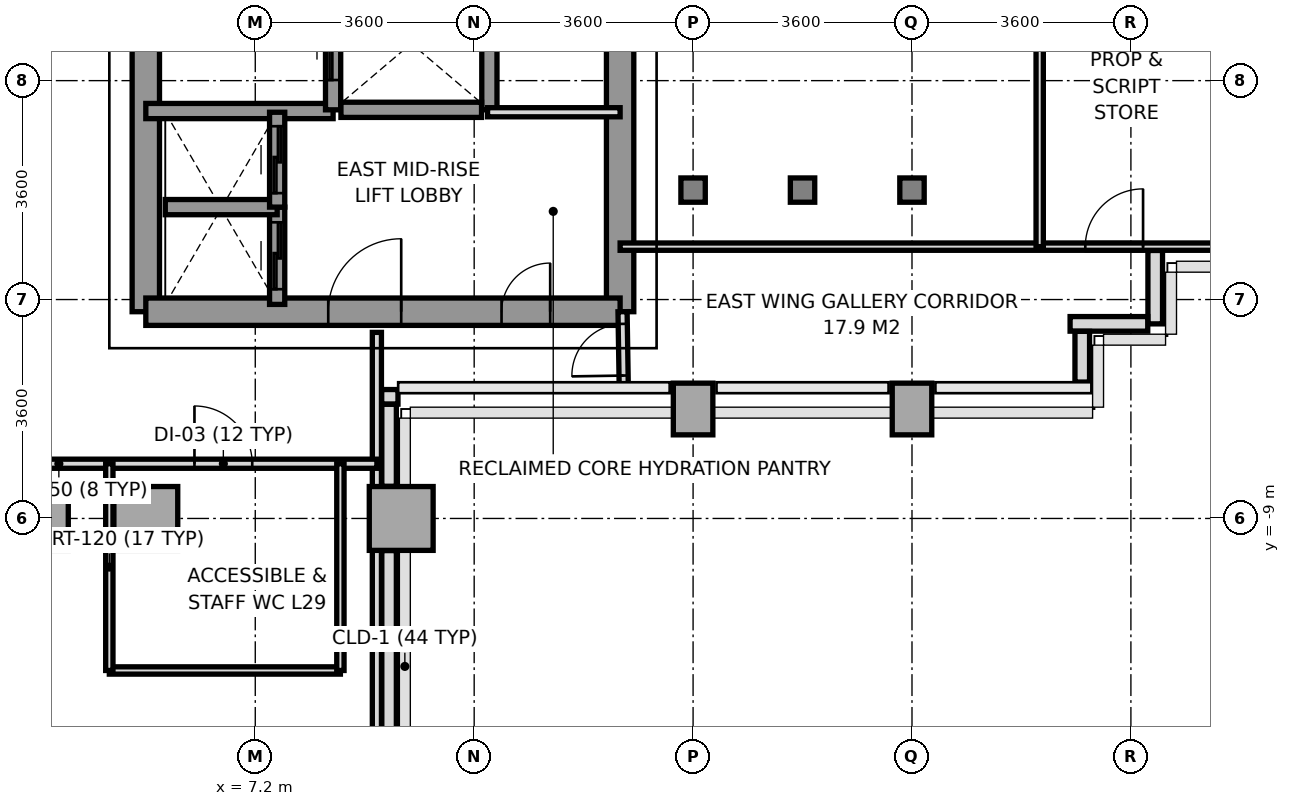
"""IFC4 building model, lengths in metres.
Left out: names, types, materials, properties, quantities, classifications, styles, units other than length and angle.
Written with IfcOpenShell. Run it as: python <this file> out.ifc"""

import sys

from ifc_helpers import new_model, si_unit, direction, frame, frame_2d, origin, origin_2d, place, context, subcontext, project, spatial, rectangle, i_section, extrude, source, transform, mapped, element, fill, save


model = new_model("IFC4")
c1 = context("Model", 3, precision=1e-05, world=origin(), true_north=direction((0.0, 1.0)))
c2 = subcontext(c1, "Body", "Model", "MODEL_VIEW")
j1 = project(units=[si_unit("LENGTHUNIT", "METRE"), si_unit("PLANEANGLEUNIT", "RADIAN")], contexts=[c1])
p1 = place(None, origin())
s1 = spatial("IfcSite", under=j1, at=p1, CompositionType="ELEMENT")
p2 = place(p1, origin())
s2 = spatial("IfcBuilding", under=s1, at=p2, CompositionType="ELEMENT")
p3 = place(p2, frame((0.0, 0.0, 110.8)))
s3 = spatial("IfcBuildingStorey", under=s2, at=p3, CompositionType="ELEMENT", Elevation=110.8)
m1 = source(origin(), c2, "Body", "SweptSolid", [
    extrude(rectangle(XDim=1.05, YDim=1.05, at=origin_2d()), origin(), (0.0, 0.0, 1.0), 3.2),
])
for number, where, z_axis, x_axis in (
    (1, (3.6, -9.0, 0.0), (0.0, 0.0, 1.0), (1.0, 0.0, 0.0)),
    (2, (5.4, -9.0, 0.0), (0.0, 0.0, 1.0), (1.0, 0.0, 0.0)),
    (3, (9.6, -9.0, 0.0), (0.0, 0.0, 1.0), (1.0, 0.0, 0.0)),
):
    element("IfcColumn", number, at=place(p3, frame(where, z_axis=z_axis, x_axis=x_axis)), inside=s3, PredefinedType="COLUMN", context=c2, shape_type="MappedRepresentation", body=[
        mapped(m1, transform((0.0, 0.0, 0.0), x_axis=(1.0, 0.0, 0.0), y_axis=(0.0, 1.0, 0.0), z_axis=(0.0, 0.0, 1.0), scale=1.0)),
    ])
m2 = source(origin(), c2, "Body", "SweptSolid", [
    extrude(rectangle(XDim=0.65, YDim=0.85, at=origin_2d()), origin(), (0.0, 0.0, 1.0), 3.2),
])
p4 = place(p3, frame((14.4, -7.2, 0.0), z_axis=(0.0, 0.0, 1.0), x_axis=(1.0, 0.0, 0.0)))
e4 = element("IfcColumn", 4, at=p4, inside=s3, PredefinedType="COLUMN", context=c2, shape_type="MappedRepresentation", body=[
    mapped(m2, transform((0.0, 0.0, 0.0), x_axis=(1.0, 0.0, 0.0), y_axis=(0.0, 1.0, 0.0), z_axis=(0.0, 0.0, 1.0), scale=1.0)),
])
m3 = source(origin(), c2, "Body", "SweptSolid", [
    extrude(i_section(OverallWidth=0.401, OverallDepth=0.399, WebThickness=0.02, FlangeThickness=0.032, at=origin_2d()), origin(), (0.0, 0.0, 1.0), 3.2),
])
for number, where, z_axis, x_axis in (
    (5, (14.4, -3.6, 0.0), (0.0, 0.0, 1.0), (1.0, 0.0, 0.0)),
    (6, (16.2, -3.6, 0.0), (0.0, 0.0, 1.0), (1.0, 0.0, 0.0)),
):
    element("IfcColumn", number, at=place(p3, frame(where, z_axis=z_axis, x_axis=x_axis)), inside=s3, PredefinedType="COLUMN", context=c2, shape_type="MappedRepresentation", body=[
        mapped(m3, transform((0.0, 0.0, 0.0), x_axis=(1.0, 0.0, 0.0), y_axis=(0.0, 1.0, 0.0), z_axis=(0.0, 0.0, 1.0), scale=1.0)),
    ])
p5 = place(p3, frame((18.0, -7.2, 0.0), z_axis=(0.0, 0.0, 1.0), x_axis=(1.0, 0.0, 0.0)))
e7 = element("IfcColumn", 7, at=p5, inside=s3, PredefinedType="COLUMN", context=c2, shape_type="MappedRepresentation", body=[
    mapped(m2, transform((0.0, 0.0, 0.0), x_axis=(1.0, 0.0, 0.0), y_axis=(0.0, 1.0, 0.0), z_axis=(0.0, 0.0, 1.0), scale=1.0)),
])
p6 = place(p3, frame((18.0, -3.6, 0.0), z_axis=(0.0, 0.0, 1.0), x_axis=(1.0, 0.0, 0.0)))
e8 = element("IfcColumn", 8, at=p6, inside=s3, PredefinedType="COLUMN", context=c2, shape_type="MappedRepresentation", body=[
    mapped(m3, transform((0.0, 0.0, 0.0), x_axis=(1.0, 0.0, 0.0), y_axis=(0.0, 1.0, 0.0), z_axis=(0.0, 0.0, 1.0), scale=1.0)),
])
p7 = place(p3, frame((22.0, -4.593, 0.0), z_axis=(0.0, 0.0, 1.0), x_axis=(0.0, -1.0, 0.0)))
e9 = element("IfcWall", 9, at=p7, inside=s3, PredefinedType="PARAPET", context=c2, shape_type="SweptSolid", body=[
    extrude(rectangle(XDim=1.207, YDim=0.24, at=frame_2d((0.604, 0.0))), origin(), (0.0, 0.0, 1.0), 1.15),
])
p8 = place(p3, frame((21.877, -5.8, 0.0), z_axis=(0.0, 0.0, 1.0), x_axis=(-1.0, 0.0, 0.0)))
e10 = element("IfcWall", 10, at=p8, inside=s3, PredefinedType="PARAPET", context=c2, shape_type="SweptSolid", body=[
    extrude(rectangle(XDim=1.277, YDim=0.24, at=frame_2d((0.638, 0.0))), origin(), (0.0, 0.0, 1.0), 1.15),
])
p9 = place(p3, frame((20.8, -5.923, 0.0), z_axis=(0.0, 0.0, 1.0), x_axis=(0.0, -1.0, 0.0)))
e11 = element("IfcWall", 11, at=p9, inside=s3, PredefinedType="PARAPET", context=c2, shape_type="SweptSolid", body=[
    extrude(rectangle(XDim=0.834, YDim=0.24, at=frame_2d((0.417, 0.0))), origin(), (0.0, 0.0, 1.0), 1.15),
])
p10 = place(p3, frame((9.547, -7.0, 0.0), z_axis=(0.0, 0.0, 1.0), x_axis=(-1.0, 0.0, 0.0)))
e12 = element("IfcWall", 12, at=p10, inside=s3, PredefinedType="PARAPET", context=c2, shape_type="SweptSolid", body=[
    extrude(rectangle(XDim=0.269, YDim=0.24, at=frame_2d((0.135, 0.0))), origin(), (0.0, 0.0, 1.0), 1.15),
])
p11 = place(p3, frame((9.4, -7.123, 0.0), z_axis=(0.0, 0.0, 1.0), x_axis=(0.0, -1.0, 0.0)))
e13 = element("IfcWall", 13, at=p11, inside=s3, PredefinedType="PARAPET", context=c2, shape_type="SweptSolid", body=[
    extrude(rectangle(XDim=1.349, YDim=0.24, at=frame_2d((0.674, 0.0))), origin(), (0.0, 0.0, 1.0), 1.15),
])
p12 = place(p3, frame((9.4, -9.528, 0.0), z_axis=(0.0, 0.0, 1.0), x_axis=(0.0, -1.0, 0.0)))
e14 = element("IfcWall", 14, at=p12, inside=s3, PredefinedType="PARAPET", context=c2, shape_type="SweptSolid", body=[
    extrude(rectangle(XDim=6.075, YDim=0.24, at=frame_2d((3.037, 0.0))), origin(), (0.0, 0.0, 1.0), 1.15),
])
p13 = place(p3, frame((13.2, -5.6, 0.0), z_axis=(0.0, 0.0, 1.0), x_axis=(0.0, 1.0, 0.0)))
e15 = element("IfcWall", 15, at=p13, inside=s3, PredefinedType="SHEAR", context=c2, shape_type="SweptSolid", body=[
    extrude(rectangle(XDim=11.2, YDim=0.45, at=frame_2d((5.6, 0.0))), origin(), (0.0, 0.0, 1.0), 3.2),
])
p14 = place(p3, frame((5.4, -5.6, 0.0), z_axis=(0.0, 0.0, 1.0), x_axis=(0.0, 1.0, 0.0)))
e16 = element("IfcWall", 16, at=p14, inside=s3, PredefinedType="SHEAR", context=c2, shape_type="SweptSolid", body=[
    extrude(rectangle(XDim=12.5, YDim=0.45, at=frame_2d((6.25, 0.0))), origin(), (0.0, 0.0, 1.0), 3.2),
])
p15 = place(p14, frame((4.55, 0.0, 0.0)))
e17 = element("IfcOpeningElement", 17, at=p15, cuts=e16, PredefinedType="OPENING", context=c2, shape_type="SweptSolid", body=[
    extrude(rectangle(XDim=1.2, YDim=2.2, at=frame_2d((0.6, 1.1))), frame((0.0, 0.235, 0.0), z_axis=(0.0, -1.0, 0.0), x_axis=(1.0, 0.0, 0.0)), (0.0, 0.0, 1.0), 0.47),
])
p16 = place(p3, frame((5.4, -5.6, 0.0), z_axis=(0.0, 0.0, 1.0), x_axis=(1.0, 0.0, 0.0)))
e18 = element("IfcWall", 18, at=p16, inside=s3, PredefinedType="SHEAR", context=c2, shape_type="SweptSolid", body=[
    extrude(rectangle(XDim=7.8, YDim=0.45, at=frame_2d((3.9, 0.0))), origin(), (0.0, 0.0, 1.0), 3.2),
])
p17 = place(p16, frame((3.0, 0.0, 0.0)))
e19 = element("IfcOpeningElement", 19, at=p17, cuts=e18, PredefinedType="OPENING", context=c2, shape_type="SweptSolid", body=[
    extrude(rectangle(XDim=1.2, YDim=2.2, at=frame_2d((0.6, 1.1))), frame((0.0, 0.235, 0.0), z_axis=(0.0, -1.0, 0.0), x_axis=(1.0, 0.0, 0.0)), (0.0, 0.0, 1.0), 0.47),
])
p18 = place(p16, frame((5.85, 0.0, 0.0)))
e20 = element("IfcOpeningElement", 20, at=p18, cuts=e18, PredefinedType="OPENING", context=c2, shape_type="SweptSolid", body=[
    extrude(rectangle(XDim=0.8, YDim=2.1, at=frame_2d((0.4, 1.05))), frame((0.0, 0.235, 0.0), z_axis=(0.0, -1.0, 0.0), x_axis=(1.0, 0.0, 0.0)), (0.0, 0.0, 1.0), 0.47),
])
p19 = place(p3, frame((5.4, -2.3, 0.0), z_axis=(0.0, 0.0, 1.0), x_axis=(1.0, 0.0, 0.0)))
e21 = element("IfcWall", 21, at=p19, inside=s3, PredefinedType="SOLIDWALL", context=c2, shape_type="SweptSolid", body=[
    extrude(rectangle(XDim=3.08, YDim=0.25, at=frame_2d((1.54, 0.0))), origin(), (0.0, 0.0, 1.0), 3.2),
])
p20 = place(p3, frame((8.48, -2.28, 0.0), z_axis=(0.0, 0.0, 1.0), x_axis=(0.0, 1.0, 0.0)))
e22 = element("IfcWall", 22, at=p20, inside=s3, PredefinedType="SOLIDWALL", context=c2, shape_type="SweptSolid", body=[
    extrude(rectangle(XDim=2.18, YDim=0.25, at=frame_2d((1.09, 0.0))), origin(), (0.0, 0.0, 1.0), 3.2),
])
p21 = place(p20, frame((0.49, 0.0, 0.0)))
e23 = element("IfcOpeningElement", 23, at=p21, cuts=e22, PredefinedType="OPENING", context=c2, shape_type="SweptSolid", body=[
    extrude(rectangle(XDim=1.2, YDim=2.2, at=frame_2d((0.6, 1.1))), frame((0.0, 0.135, 0.0), z_axis=(0.0, -1.0, 0.0), x_axis=(1.0, 0.0, 0.0)), (0.0, 0.0, 1.0), 0.27),
])
p22 = place(p3, frame((11.05, -2.28, 0.0), z_axis=(0.0, 0.0, 1.0), x_axis=(0.0, 1.0, 0.0)))
e24 = element("IfcWall", 24, at=p22, inside=s3, PredefinedType="SOLIDWALL", context=c2, shape_type="SweptSolid", body=[
    extrude(rectangle(XDim=2.18, YDim=0.25, at=frame_2d((1.09, 0.0))), origin(), (0.0, 0.0, 1.0), 3.2),
])
p23 = place(p3, frame((8.609, -2.28, 0.0), z_axis=(0.0, 0.0, 1.0), x_axis=(1.0, 0.0, 0.0)))
e25 = element("IfcWall", 25, at=p23, inside=s3, PredefinedType="SOLIDWALL", context=c2, shape_type="SweptSolid", body=[
    extrude(rectangle(XDim=2.312, YDim=0.25, at=frame_2d((1.156, 0.0))), origin(), (0.0, 0.0, 1.0), 3.2),
])
p24 = place(p3, frame((7.56, -5.48, 0.0), z_axis=(0.0, 0.0, 1.0), x_axis=(0.0, 1.0, 0.0)))
e26 = element("IfcWall", 26, at=p24, inside=s3, PredefinedType="SOLIDWALL", context=c2, shape_type="SweptSolid", body=[
    extrude(rectangle(XDim=1.6, YDim=0.25, at=frame_2d((0.8, 0.0))), origin(), (0.0, 0.0, 1.0), 3.2),
])
p25 = place(p24, frame((0.25, 0.0, 0.0)))
e27 = element("IfcOpeningElement", 27, at=p25, cuts=e26, PredefinedType="OPENING", context=c2, shape_type="SweptSolid", body=[
    extrude(rectangle(XDim=1.1, YDim=2.2, at=frame_2d((0.55, 1.1))), frame((0.0, 0.135, 0.0), z_axis=(0.0, -1.0, 0.0), x_axis=(1.0, 0.0, 0.0)), (0.0, 0.0, 1.0), 0.27),
])
p26 = place(p3, frame((5.72, -3.88, 0.0), z_axis=(0.0, 0.0, 1.0), x_axis=(1.0, 0.0, 0.0)))
e28 = element("IfcWall", 28, at=p26, inside=s3, PredefinedType="SOLIDWALL", context=c2, shape_type="SweptSolid", body=[
    extrude(rectangle(XDim=1.84, YDim=0.25, at=frame_2d((0.92, 0.0))), origin(), (0.0, 0.0, 1.0), 3.2),
])
p27 = place(p3, frame((7.56, -3.88, 0.0), z_axis=(0.0, 0.0, 1.0), x_axis=(0.0, 1.0, 0.0)))
e29 = element("IfcWall", 29, at=p27, inside=s3, PredefinedType="SOLIDWALL", context=c2, shape_type="SweptSolid", body=[
    extrude(rectangle(XDim=1.56, YDim=0.25, at=frame_2d((0.78, 0.0))), origin(), (0.0, 0.0, 1.0), 3.2),
])
p28 = place(p27, frame((0.23, 0.0, 0.0)))
e30 = element("IfcOpeningElement", 30, at=p28, cuts=e29, PredefinedType="OPENING", context=c2, shape_type="SweptSolid", body=[
    extrude(rectangle(XDim=1.1, YDim=2.2, at=frame_2d((0.55, 1.1))), frame((0.0, 0.135, 0.0), z_axis=(0.0, -1.0, 0.0), x_axis=(1.0, 0.0, 0.0)), (0.0, 0.0, 1.0), 0.27),
])
p29 = place(p3, frame((11.02, -2.32, 0.0), z_axis=(0.0, 0.0, 1.0), x_axis=(1.0, 0.0, 0.0)))
e31 = element("IfcWall", 31, at=p29, inside=s3, PredefinedType="PARTITIONING", context=c2, shape_type="SweptSolid", body=[
    extrude(rectangle(XDim=2.18, YDim=0.15, at=frame_2d((1.09, 0.0))), origin(), (0.0, 0.0, 1.0), 3.2),
])
p30 = place(p3, frame((9.2, -15.68, 0.0), z_axis=(0.0, 0.0, 1.0), x_axis=(0.0, 1.0, 0.0)))
e32 = element("IfcWall", 32, at=p30, inside=s3, PredefinedType="PARTITIONING", context=c2, shape_type="SweptSolid", body=[
    extrude(rectangle(XDim=9.74, YDim=0.15, at=frame_2d((4.87, 0.0))), origin(), (0.0, 0.0, 1.0), 2.7),
])
p31 = place(p3, frame((-1.26, -8.1, 0.0), z_axis=(0.0, 0.0, 1.0), x_axis=(1.0, 0.0, 0.0)))
e33 = element("IfcWall", 33, at=p31, inside=s3, PredefinedType="PARTITIONING", context=c2, shape_type="SweptSolid", body=[
    extrude(rectangle(XDim=10.46, YDim=0.15, at=frame_2d((5.23, 0.0))), origin(), (0.0, 0.0, 1.0), 2.76),
])
p32 = place(p31, frame((7.46, 0.0, 0.0)))
e34 = element("IfcOpeningElement", 34, at=p32, cuts=e33, PredefinedType="OPENING", context=c2, shape_type="SweptSolid", body=[
    extrude(rectangle(XDim=0.95, YDim=2.15, at=frame_2d((0.475, 1.075))), frame((0.0, 0.085, 0.0), z_axis=(0.0, -1.0, 0.0), x_axis=(1.0, 0.0, 0.0)), (0.0, 0.0, 1.0), 0.17),
])
p33 = place(p3, frame((4.8, -11.5, 0.0), z_axis=(0.0, 0.0, 1.0), x_axis=(1.0, 0.0, 0.0)))
e35 = element("IfcWall", 35, at=p33, inside=s3, PredefinedType="PARTITIONING", context=c2, shape_type="SweptSolid", body=[
    extrude(rectangle(XDim=3.8, YDim=0.12, at=frame_2d((1.9, 0.0))), origin(), (0.0, 0.0, 1.0), 3.2),
])
p34 = place(p3, frame((4.8, -11.5, 0.0), z_axis=(0.0, 0.0, 1.0), x_axis=(0.0, 1.0, 0.0)))
e36 = element("IfcWall", 36, at=p34, inside=s3, PredefinedType="PARTITIONING", context=c2, shape_type="SweptSolid", body=[
    extrude(rectangle(XDim=3.4, YDim=0.12, at=frame_2d((1.7, 0.0))), origin(), (0.0, 0.0, 1.0), 3.2),
])
p35 = place(p3, frame((8.6, -11.5, 0.0), z_axis=(0.0, 0.0, 1.0), x_axis=(0.0, 1.0, 0.0)))
e37 = element("IfcWall", 37, at=p35, inside=s3, PredefinedType="PARTITIONING", context=c2, shape_type="SweptSolid", body=[
    extrude(rectangle(XDim=3.4, YDim=0.12, at=frame_2d((1.7, 0.0))), origin(), (0.0, 0.0, 1.0), 2.7),
])
p36 = place(p3, frame((13.26, -6.85, 0.0), z_axis=(0.0, 0.0, 1.0), x_axis=(-0.016013571389, 0.999871774545, 0.0)))
e38 = element("IfcWall", 38, at=p36, inside=s3, PredefinedType="PARTITIONING", context=c2, shape_type="SweptSolid", body=[
    extrude(rectangle(XDim=1.25, YDim=0.15, at=frame_2d((0.625, 0.0))), origin(), (0.0, 0.0, 1.0), 3.2),
])
p37 = place(p36, frame((0.2, 0.0, 0.0)))
e39 = element("IfcOpeningElement", 39, at=p37, cuts=e38, PredefinedType="OPENING", context=c2, shape_type="SweptSolid", body=[
    extrude(rectangle(XDim=0.85, YDim=2.1, at=frame_2d((0.425, 1.05))), frame((0.0, 0.085, 0.0), z_axis=(0.0, -1.0, 0.0), x_axis=(1.0, 0.0, 0.0)), (0.0, 0.0, 1.0), 0.17),
])
p38 = place(p3, frame((13.2, -4.53, 0.0), z_axis=(0.0, 0.0, 1.0), x_axis=(1.0, 0.0, 0.0)))
e40 = element("IfcWall", 40, at=p38, inside=s3, PredefinedType="PARTITIONING", context=c2, shape_type="SweptSolid", body=[
    extrude(rectangle(XDim=10.1, YDim=0.12, at=frame_2d((5.05, 0.0))), origin(), (0.0, 0.0, 1.0), 2.76),
])
p39 = place(p38, frame((7.65, 0.0, 0.0)))
e41 = element("IfcOpeningElement", 41, at=p39, cuts=e40, PredefinedType="OPENING", context=c2, shape_type="SweptSolid", body=[
    extrude(rectangle(XDim=0.95, YDim=2.15, at=frame_2d((0.475, 1.075))), frame((0.0, 0.07, 0.0), z_axis=(0.0, -1.0, 0.0), x_axis=(1.0, 0.0, 0.0)), (0.0, 0.0, 1.0), 0.14),
])
p40 = place(p3, frame((20.1, -4.53, 0.0), z_axis=(0.0, 0.0, 1.0), x_axis=(0.0, 1.0, 0.0)))
e42 = element("IfcWall", 42, at=p40, inside=s3, PredefinedType="PARTITIONING", context=c2, shape_type="SweptSolid", body=[
    extrude(rectangle(XDim=11.38, YDim=0.12, at=frame_2d((5.69, 0.0))), origin(), (0.0, 0.0, 1.0), 2.7),
])
p41 = place(p40, frame((4.8, 0.0, 0.0)))
e43 = element("IfcOpeningElement", 43, at=p41, cuts=e42, PredefinedType="OPENING", context=c2, shape_type="SweptSolid", body=[
    extrude(rectangle(XDim=0.95, YDim=2.15, at=frame_2d((0.475, 1.075))), frame((0.0, 0.07, 0.0), z_axis=(0.0, -1.0, 0.0), x_axis=(1.0, 0.0, 0.0)), (0.0, 0.0, 1.0), 0.14),
])
m4 = source(origin(), c2, "Body", "SweptSolid", [
    extrude(rectangle(XDim=1.2, YDim=2.2, at=frame_2d((0.6, 1.1))), frame((0.0, 0.025, 0.0), z_axis=(0.0, -1.0, 0.0), x_axis=(1.0, 0.0, 0.0)), (0.0, 0.0, 1.0), 0.05),
])
p42 = place(p17, origin())
e44 = element("IfcDoor", 44, at=p42, inside=s3, OperationType="SINGLE_SWING_RIGHT", PredefinedType="DOOR", context=c2, shape_type="MappedRepresentation", body=[
    mapped(m4, transform((0.0, 0.0, 0.0), x_axis=(1.0, 0.0, 0.0), y_axis=(0.0, 1.0, 0.0), z_axis=(0.0, 0.0, 1.0), scale=1.0)),
])
fill(e19, e44)
m5 = source(origin(), c2, "Body", "SweptSolid", [
    extrude(rectangle(XDim=0.8, YDim=2.1, at=frame_2d((0.4, 1.05))), frame((0.0, 0.025, 0.0), z_axis=(0.0, -1.0, 0.0), x_axis=(1.0, 0.0, 0.0)), (0.0, 0.0, 1.0), 0.05),
])
p43 = place(p18, origin())
e45 = element("IfcDoor", 45, at=p43, inside=s3, OperationType="SINGLE_SWING_RIGHT", PredefinedType="DOOR", context=c2, shape_type="MappedRepresentation", body=[
    mapped(m5, transform((0.0, 0.0, 0.0), x_axis=(1.0, 0.0, 0.0), y_axis=(0.0, 1.0, 0.0), z_axis=(0.0, 0.0, 1.0), scale=1.0)),
])
fill(e20, e45)
p44 = place(p21, origin())
e46 = element("IfcDoor", 46, at=p44, inside=s3, OperationType="SLIDING_TO_RIGHT", PredefinedType="DOOR", context=c2, shape_type="MappedRepresentation", body=[
    mapped(m4, transform((0.0, 0.0, 0.0), x_axis=(1.0, 0.0, 0.0), y_axis=(0.0, 1.0, 0.0), z_axis=(0.0, 0.0, 1.0), scale=1.0)),
])
fill(e23, e46)
m6 = source(origin(), c2, "Body", "SweptSolid", [
    extrude(rectangle(XDim=1.1, YDim=2.2, at=frame_2d((0.55, 1.1))), frame((0.0, 0.025, 0.0), z_axis=(0.0, -1.0, 0.0), x_axis=(1.0, 0.0, 0.0)), (0.0, 0.0, 1.0), 0.05),
])
p45 = place(p25, origin())
e47 = element("IfcDoor", 47, at=p45, inside=s3, OperationType="SLIDING_TO_LEFT", PredefinedType="DOOR", context=c2, shape_type="MappedRepresentation", body=[
    mapped(m6, transform((0.0, 0.0, 0.0), x_axis=(1.0, 0.0, 0.0), y_axis=(0.0, 1.0, 0.0), z_axis=(0.0, 0.0, 1.0), scale=1.0)),
])
fill(e27, e47)
p46 = place(p28, origin())
e48 = element("IfcDoor", 48, at=p46, inside=s3, OperationType="SLIDING_TO_LEFT", PredefinedType="DOOR", context=c2, shape_type="MappedRepresentation", body=[
    mapped(m6, transform((0.0, 0.0, 0.0), x_axis=(1.0, 0.0, 0.0), y_axis=(0.0, 1.0, 0.0), z_axis=(0.0, 0.0, 1.0), scale=1.0)),
])
fill(e30, e48)
m7 = source(origin(), c2, "Body", "SweptSolid", [
    extrude(rectangle(XDim=0.95, YDim=2.15, at=frame_2d((0.475, 1.075))), frame((0.0, 0.025, 0.0), z_axis=(0.0, -1.0, 0.0), x_axis=(1.0, 0.0, 0.0)), (0.0, 0.0, 1.0), 0.05),
])
p47 = place(p32, origin())
e49 = element("IfcDoor", 49, at=p47, inside=s3, OperationType="SINGLE_SWING_LEFT", PredefinedType="DOOR", context=c2, shape_type="MappedRepresentation", body=[
    mapped(m7, transform((0.0, 0.0, 0.0), x_axis=(1.0, 0.0, 0.0), y_axis=(0.0, 1.0, 0.0), z_axis=(0.0, 0.0, 1.0), scale=1.0)),
])
fill(e34, e49)
m8 = source(origin(), c2, "Body", "SweptSolid", [
    extrude(rectangle(XDim=0.85, YDim=2.1, at=frame_2d((0.425, 1.05))), frame((0.0, 0.025, 0.0), z_axis=(0.0, -1.0, 0.0), x_axis=(1.0, 0.0, 0.0)), (0.0, 0.0, 1.0), 0.05),
])
p48 = place(p37, origin())
e50 = element("IfcDoor", 50, at=p48, inside=s3, OperationType="SINGLE_SWING_LEFT", PredefinedType="DOOR", context=c2, shape_type="MappedRepresentation", body=[
    mapped(m8, transform((0.0, 0.0, 0.0), x_axis=(1.0, 0.0, 0.0), y_axis=(0.0, 1.0, 0.0), z_axis=(0.0, 0.0, 1.0), scale=1.0)),
])
fill(e39, e50)
p49 = place(p39, origin())
e51 = element("IfcDoor", 51, at=p49, inside=s3, OperationType="SINGLE_SWING_RIGHT", PredefinedType="DOOR", context=c2, shape_type="MappedRepresentation", body=[
    mapped(m7, transform((0.0, 0.0, 0.0), x_axis=(1.0, 0.0, 0.0), y_axis=(0.0, 1.0, 0.0), z_axis=(0.0, 0.0, 1.0), scale=1.0)),
])
fill(e41, e51)
save(model, sys.argv[1])
